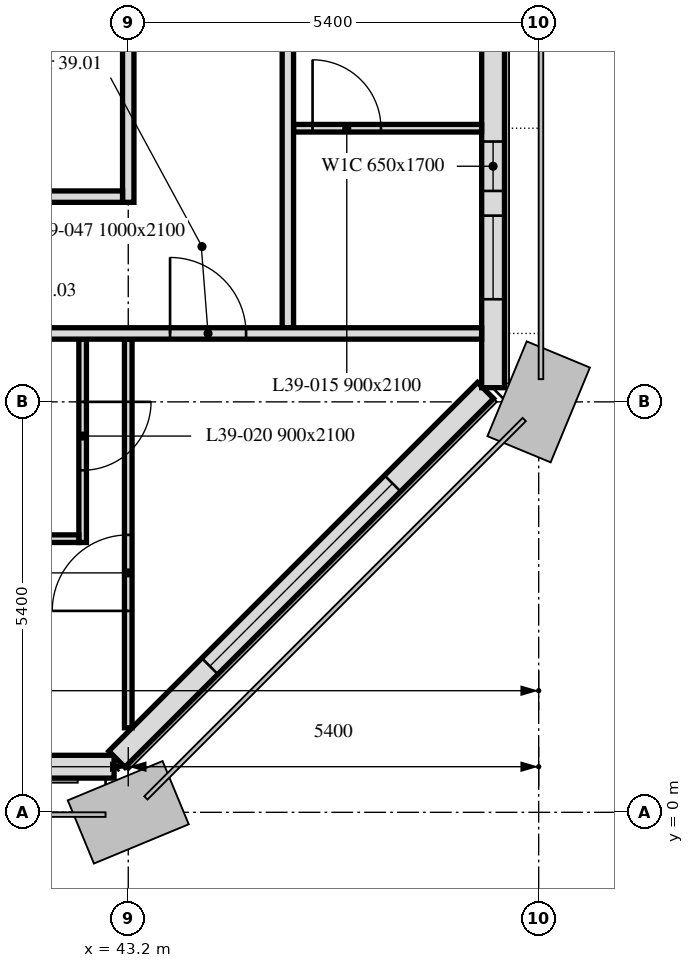
"""IFC4 building model, lengths in metres.
Left out: names, types, materials, properties, quantities, classifications, styles, units other than length and angle.
Written with IfcOpenShell. Run it as: python <this file> out.ifc"""

import sys

from ifc_helpers import new_model, si_unit, direction, frame, frame_2d, origin, place, context, subcontext, project, spatial, rectangle, extrude, element, fill, save


model = new_model("IFC4")
c1 = context("Model", 3, precision=1e-05, world=origin(), true_north=direction((0.0, 1.0)))
c2 = subcontext(c1, "Body", "Model", "MODEL_VIEW")
j1 = project(units=[si_unit("LENGTHUNIT", "METRE"), si_unit("PLANEANGLEUNIT", "RADIAN")], contexts=[c1])
p1 = place(None, origin())
s1 = spatial("IfcSite", under=j1, at=p1, CompositionType="ELEMENT")
p2 = place(p1, origin())
s2 = spatial("IfcBuilding", under=s1, at=p2, CompositionType="ELEMENT")
p3 = place(p2, frame((0.0, 0.0, 166.0)))
s3 = spatial("IfcBuildingStorey", under=s2, at=p3, CompositionType="ELEMENT", Elevation=166.0)
p4 = place(p3, frame((10.986, 0.6, 0.0), z_axis=(0.0, 0.0, 1.0), x_axis=(1.0, 0.0, 0.0)))
e1 = element("IfcWall", 1, at=p4, inside=s3, PredefinedType="SOLIDWALL", context=c2, shape_type="SweptSolid", body=[
    extrude(rectangle(XDim=32.027, YDim=0.3, at=frame_2d((16.014, 0.0))), origin(), (0.0, 0.0, 1.0), 3.0),
])
p5 = place(p4, frame((0.814, 0.0, 0.9)))
e2 = element("IfcOpeningElement", 2, at=p5, cuts=e1, PredefinedType="OPENING", context=c2, shape_type="SweptSolid", body=[
    extrude(rectangle(XDim=3.4, YDim=1.7, at=frame_2d((1.7, 0.85))), frame((0.0, 0.16, 0.0), z_axis=(0.0, -1.0, 0.0), x_axis=(1.0, 0.0, 0.0)), (0.0, 0.0, 1.0), 0.32),
])
p6 = place(p4, frame((6.564, 0.0, 0.9)))
e3 = element("IfcOpeningElement", 3, at=p6, cuts=e1, PredefinedType="OPENING", context=c2, shape_type="SweptSolid", body=[
    extrude(rectangle(XDim=1.1, YDim=1.7, at=frame_2d((0.55, 0.85))), frame((0.0, 0.16, 0.0), z_axis=(0.0, -1.0, 0.0), x_axis=(1.0, 0.0, 0.0)), (0.0, 0.0, 1.0), 0.32),
])
p7 = place(p4, frame((11.614, 0.0, 0.9)))
e4 = element("IfcOpeningElement", 4, at=p7, cuts=e1, PredefinedType="OPENING", context=c2, shape_type="SweptSolid", body=[
    extrude(rectangle(XDim=3.4, YDim=1.7, at=frame_2d((1.7, 0.85))), frame((0.0, 0.16, 0.0), z_axis=(0.0, -1.0, 0.0), x_axis=(1.0, 0.0, 0.0)), (0.0, 0.0, 1.0), 0.32),
])
p8 = place(p4, frame((17.364, 0.0, 0.9)))
e5 = element("IfcOpeningElement", 5, at=p8, cuts=e1, PredefinedType="OPENING", context=c2, shape_type="SweptSolid", body=[
    extrude(rectangle(XDim=1.1, YDim=1.7, at=frame_2d((0.55, 0.85))), frame((0.0, 0.16, 0.0), z_axis=(0.0, -1.0, 0.0), x_axis=(1.0, 0.0, 0.0)), (0.0, 0.0, 1.0), 0.32),
])
p9 = place(p4, frame((22.414, 0.0, 0.9)))
e6 = element("IfcOpeningElement", 6, at=p9, cuts=e1, PredefinedType="OPENING", context=c2, shape_type="SweptSolid", body=[
    extrude(rectangle(XDim=3.4, YDim=1.7, at=frame_2d((1.7, 0.85))), frame((0.0, 0.16, 0.0), z_axis=(0.0, -1.0, 0.0), x_axis=(1.0, 0.0, 0.0)), (0.0, 0.0, 1.0), 0.32),
])
p10 = place(p4, frame((28.164, 0.0, 0.9)))
e7 = element("IfcOpeningElement", 7, at=p10, cuts=e1, PredefinedType="OPENING", context=c2, shape_type="SweptSolid", body=[
    extrude(rectangle(XDim=1.1, YDim=1.7, at=frame_2d((0.55, 0.85))), frame((0.0, 0.16, 0.0), z_axis=(0.0, -1.0, 0.0), x_axis=(1.0, 0.0, 0.0)), (0.0, 0.0, 1.0), 0.32),
])
p11 = place(p3, frame((43.051, 0.699, 0.0), z_axis=(0.0, 0.0, 1.0), x_axis=(0.707106781187, 0.707106781187, 0.0)))
e8 = element("IfcWall", 8, at=p11, inside=s3, PredefinedType="SOLIDWALL", context=c2, shape_type="SweptSolid", body=[
    extrude(rectangle(XDim=6.86, YDim=0.3, at=frame_2d((3.43, 0.0))), origin(), (0.0, 0.0, 1.0), 3.0),
])
p12 = place(p11, frame((1.73, 0.0, 0.9)))
e9 = element("IfcOpeningElement", 9, at=p12, cuts=e8, PredefinedType="OPENING", context=c2, shape_type="SweptSolid", body=[
    extrude(rectangle(XDim=3.4, YDim=1.7, at=frame_2d((1.7, 0.85))), frame((0.0, 0.16, 0.0), z_axis=(0.0, -1.0, 0.0), x_axis=(1.0, 0.0, 0.0)), (0.0, 0.0, 1.0), 0.32),
])
p13 = place(p3, frame((48.0, 5.586, 0.0), z_axis=(0.0, 0.0, 1.0), x_axis=(0.0, 1.0, 0.0)))
e10 = element("IfcWall", 10, at=p13, inside=s3, PredefinedType="SOLIDWALL", context=c2, shape_type="SweptSolid", body=[
    extrude(rectangle(XDim=32.027, YDim=0.3, at=frame_2d((16.014, 0.0))), origin(), (0.0, 0.0, 1.0), 3.0),
])
p14 = place(p13, frame((1.164, 0.0, 0.9)))
e11 = element("IfcOpeningElement", 11, at=p14, cuts=e10, PredefinedType="OPENING", context=c2, shape_type="SweptSolid", body=[
    extrude(rectangle(XDim=1.1, YDim=1.7, at=frame_2d((0.55, 0.85))), frame((0.0, 0.16, 0.0), z_axis=(0.0, -1.0, 0.0), x_axis=(1.0, 0.0, 0.0)), (0.0, 0.0, 1.0), 0.32),
])
p15 = place(p13, frame((2.589, 0.0, 0.9)))
e12 = element("IfcOpeningElement", 12, at=p15, cuts=e10, PredefinedType="OPENING", context=c2, shape_type="SweptSolid", body=[
    extrude(rectangle(XDim=0.65, YDim=1.7, at=frame_2d((0.325, 0.85))), frame((0.0, 0.16, 0.0), z_axis=(0.0, -1.0, 0.0), x_axis=(1.0, 0.0, 0.0)), (0.0, 0.0, 1.0), 0.32),
])
p16 = place(p13, frame((6.564, 0.0, 0.9)))
e13 = element("IfcOpeningElement", 13, at=p16, cuts=e10, PredefinedType="OPENING", context=c2, shape_type="SweptSolid", body=[
    extrude(rectangle(XDim=1.1, YDim=1.7, at=frame_2d((0.55, 0.85))), frame((0.0, 0.16, 0.0), z_axis=(0.0, -1.0, 0.0), x_axis=(1.0, 0.0, 0.0)), (0.0, 0.0, 1.0), 0.32),
])
p17 = place(p13, frame((8.164, 0.0, 0.9)))
e14 = element("IfcOpeningElement", 14, at=p17, cuts=e10, PredefinedType="OPENING", context=c2, shape_type="SweptSolid", body=[
    extrude(rectangle(XDim=1.1, YDim=1.7, at=frame_2d((0.55, 0.85))), frame((0.0, 0.16, 0.0), z_axis=(0.0, -1.0, 0.0), x_axis=(1.0, 0.0, 0.0)), (0.0, 0.0, 1.0), 0.32),
])
p18 = place(p13, frame((11.614, 0.0, 0.9)))
e15 = element("IfcOpeningElement", 15, at=p18, cuts=e10, PredefinedType="OPENING", context=c2, shape_type="SweptSolid", body=[
    extrude(rectangle(XDim=3.4, YDim=1.7, at=frame_2d((1.7, 0.85))), frame((0.0, 0.16, 0.0), z_axis=(0.0, -1.0, 0.0), x_axis=(1.0, 0.0, 0.0)), (0.0, 0.0, 1.0), 0.32),
])
p19 = place(p13, frame((17.364, 0.0, 0.9)))
e16 = element("IfcOpeningElement", 16, at=p19, cuts=e10, PredefinedType="OPENING", context=c2, shape_type="SweptSolid", body=[
    extrude(rectangle(XDim=1.1, YDim=1.7, at=frame_2d((0.55, 0.85))), frame((0.0, 0.16, 0.0), z_axis=(0.0, -1.0, 0.0), x_axis=(1.0, 0.0, 0.0)), (0.0, 0.0, 1.0), 0.32),
])
p20 = place(p13, frame((18.964, 0.0, 0.9)))
e17 = element("IfcOpeningElement", 17, at=p20, cuts=e10, PredefinedType="OPENING", context=c2, shape_type="SweptSolid", body=[
    extrude(rectangle(XDim=1.1, YDim=1.7, at=frame_2d((0.55, 0.85))), frame((0.0, 0.16, 0.0), z_axis=(0.0, -1.0, 0.0), x_axis=(1.0, 0.0, 0.0)), (0.0, 0.0, 1.0), 0.32),
])
p21 = place(p13, frame((22.414, 0.0, 0.9)))
e18 = element("IfcOpeningElement", 18, at=p21, cuts=e10, PredefinedType="OPENING", context=c2, shape_type="SweptSolid", body=[
    extrude(rectangle(XDim=3.4, YDim=1.7, at=frame_2d((1.7, 0.85))), frame((0.0, 0.16, 0.0), z_axis=(0.0, -1.0, 0.0), x_axis=(1.0, 0.0, 0.0)), (0.0, 0.0, 1.0), 0.32),
])
p22 = place(p13, frame((28.164, 0.0, 0.9)))
e19 = element("IfcOpeningElement", 19, at=p22, cuts=e10, PredefinedType="OPENING", context=c2, shape_type="SweptSolid", body=[
    extrude(rectangle(XDim=1.1, YDim=1.7, at=frame_2d((0.55, 0.85))), frame((0.0, 0.16, 0.0), z_axis=(0.0, -1.0, 0.0), x_axis=(1.0, 0.0, 0.0)), (0.0, 0.0, 1.0), 0.32),
])
p23 = place(p13, frame((29.764, 0.0, 0.9)))
e20 = element("IfcOpeningElement", 20, at=p23, cuts=e10, PredefinedType="OPENING", context=c2, shape_type="SweptSolid", body=[
    extrude(rectangle(XDim=1.1, YDim=1.7, at=frame_2d((0.55, 0.85))), frame((0.0, 0.16, 0.0), z_axis=(0.0, -1.0, 0.0), x_axis=(1.0, 0.0, 0.0)), (0.0, 0.0, 1.0), 0.32),
])
p24 = place(p3, frame((45.375, 9.0, 0.0), z_axis=(0.0, 0.0, 1.0), x_axis=(1.0, 0.0, 0.0)))
e21 = element("IfcWall", 21, at=p24, inside=s3, PredefinedType="PARTITIONING", context=c2, shape_type="SweptSolid", body=[
    extrude(rectangle(XDim=2.474, YDim=0.1, at=frame_2d((1.237, 0.0))), origin(), (0.0, 0.0, 1.0), 3.0),
])
p25 = place(p24, frame((0.25, 0.0, 0.0)))
e22 = element("IfcOpeningElement", 22, at=p25, cuts=e21, PredefinedType="OPENING", context=c2, shape_type="SweptSolid", body=[
    extrude(rectangle(XDim=0.9, YDim=2.1, at=frame_2d((0.45, 1.05))), frame((0.0, 0.05, 0.0), z_axis=(0.0, -1.0, 0.0), x_axis=(1.0, 0.0, 0.0)), (0.0, 0.0, 1.0), 0.1),
])
p26 = place(p3, frame((45.3, 21.525, 0.0), z_axis=(0.0, 0.0, 1.0), x_axis=(0.0, -1.0, 0.0)))
e23 = element("IfcWall", 23, at=p26, inside=s3, PredefinedType="PARTITIONING", context=c2, shape_type="SweptSolid", body=[
    extrude(rectangle(XDim=15.15, YDim=0.15, at=frame_2d((7.575, 0.0))), origin(), (0.0, 0.0, 1.0), 2.4),
])
p27 = place(p26, frame((2.125, 0.0, 0.0)))
e24 = element("IfcOpeningElement", 24, at=p27, cuts=e23, PredefinedType="OPENING", context=c2, shape_type="SweptSolid", body=[
    extrude(rectangle(XDim=1.0, YDim=2.1, at=frame_2d((0.5, 1.05))), frame((0.0, 0.075, 0.0), z_axis=(0.0, -1.0, 0.0), x_axis=(1.0, 0.0, 0.0)), (0.0, 0.0, 1.0), 0.15),
])
p28 = place(p26, frame((7.958, 0.0, 0.0)))
e25 = element("IfcOpeningElement", 25, at=p28, cuts=e23, PredefinedType="OPENING", context=c2, shape_type="SweptSolid", body=[
    extrude(rectangle(XDim=1.0, YDim=2.1, at=frame_2d((0.5, 1.05))), frame((0.0, 0.075, 0.0), z_axis=(0.0, -1.0, 0.0), x_axis=(1.0, 0.0, 0.0)), (0.0, 0.0, 1.0), 0.15),
])
p29 = place(p3, frame((43.2, 1.112, 0.0), z_axis=(0.0, 0.0, 1.0), x_axis=(0.0, 1.0, 0.0)))
e26 = element("IfcWall", 26, at=p29, inside=s3, PredefinedType="PARTITIONING", context=c2, shape_type="SweptSolid", body=[
    extrude(rectangle(XDim=5.113, YDim=0.1, at=frame_2d((2.557, 0.0))), origin(), (0.0, 0.0, 1.0), 3.0),
])
p30 = place(p29, frame((1.538, 0.0, 0.0)))
e27 = element("IfcOpeningElement", 27, at=p30, cuts=e26, PredefinedType="OPENING", context=c2, shape_type="SweptSolid", body=[
    extrude(rectangle(XDim=1.0, YDim=2.1, at=frame_2d((0.5, 1.05))), frame((0.0, 0.05, 0.0), z_axis=(0.0, -1.0, 0.0), x_axis=(1.0, 0.0, 0.0)), (0.0, 0.0, 1.0), 0.1),
])
p31 = place(p3, frame((42.6, 6.225, 0.0), z_axis=(0.0, 0.0, 1.0), x_axis=(0.0, -1.0, 0.0)))
e28 = element("IfcWall", 28, at=p31, inside=s3, PredefinedType="PARTITIONING", context=c2, shape_type="SweptSolid", body=[
    extrude(rectangle(XDim=2.675, YDim=0.1, at=frame_2d((1.337, 0.0))), origin(), (0.0, 0.0, 1.0), 3.0),
])
p32 = place(p31, frame((0.825, 0.0, 0.0)))
e29 = element("IfcOpeningElement", 29, at=p32, cuts=e28, PredefinedType="OPENING", context=c2, shape_type="SweptSolid", body=[
    extrude(rectangle(XDim=0.9, YDim=2.1, at=frame_2d((0.45, 1.05))), frame((0.0, 0.05, 0.0), z_axis=(0.0, -1.0, 0.0), x_axis=(1.0, 0.0, 0.0)), (0.0, 0.0, 1.0), 0.1),
])
p33 = place(p3, frame((42.55, 3.6, 0.0), z_axis=(0.0, 0.0, 1.0), x_axis=(-1.0, 0.0, 0.0)))
e30 = element("IfcWall", 30, at=p33, inside=s3, PredefinedType="PARTITIONING", context=c2, shape_type="SweptSolid", body=[
    extrude(rectangle(XDim=2.4, YDim=0.1, at=frame_2d((1.2, 0.0))), origin(), (0.0, 0.0, 1.0), 3.0),
])
p34 = place(p3, frame((6.151, 6.3, 0.0), z_axis=(0.0, 0.0, 1.0), x_axis=(1.0, 0.0, 0.0)))
e31 = element("IfcWall", 31, at=p34, inside=s3, PredefinedType="PARTITIONING", context=c2, shape_type="SweptSolid", body=[
    extrude(rectangle(XDim=41.698, YDim=0.15, at=frame_2d((20.849, 0.0))), origin(), (0.0, 0.0, 1.0), 2.4),
])
p35 = place(p34, frame((1.132, 0.0, 0.0)))
e32 = element("IfcOpeningElement", 32, at=p35, cuts=e31, PredefinedType="OPENING", context=c2, shape_type="SweptSolid", body=[
    extrude(rectangle(XDim=1.0, YDim=2.1, at=frame_2d((0.5, 1.05))), frame((0.0, 0.075, 0.0), z_axis=(0.0, -1.0, 0.0), x_axis=(1.0, 0.0, 0.0)), (0.0, 0.0, 1.0), 0.15),
])
p36 = place(p34, frame((13.049, 0.0, 0.0)))
e33 = element("IfcOpeningElement", 33, at=p36, cuts=e31, PredefinedType="OPENING", context=c2, shape_type="SweptSolid", body=[
    extrude(rectangle(XDim=1.0, YDim=2.1, at=frame_2d((0.5, 1.05))), frame((0.0, 0.075, 0.0), z_axis=(0.0, -1.0, 0.0), x_axis=(1.0, 0.0, 0.0)), (0.0, 0.0, 1.0), 0.15),
])
p37 = place(p34, frame((17.649, 0.0, 0.0)))
e34 = element("IfcOpeningElement", 34, at=p37, cuts=e31, PredefinedType="OPENING", context=c2, shape_type="SweptSolid", body=[
    extrude(rectangle(XDim=1.0, YDim=2.1, at=frame_2d((0.5, 1.05))), frame((0.0, 0.075, 0.0), z_axis=(0.0, -1.0, 0.0), x_axis=(1.0, 0.0, 0.0)), (0.0, 0.0, 1.0), 0.15),
])
p38 = place(p34, frame((29.249, 0.0, 0.0)))
e35 = element("IfcOpeningElement", 35, at=p38, cuts=e31, PredefinedType="OPENING", context=c2, shape_type="SweptSolid", body=[
    extrude(rectangle(XDim=1.0, YDim=2.1, at=frame_2d((0.5, 1.05))), frame((0.0, 0.075, 0.0), z_axis=(0.0, -1.0, 0.0), x_axis=(1.0, 0.0, 0.0)), (0.0, 0.0, 1.0), 0.15),
])
p39 = place(p34, frame((37.599, 0.0, 0.0)))
e36 = element("IfcOpeningElement", 36, at=p39, cuts=e31, PredefinedType="OPENING", context=c2, shape_type="SweptSolid", body=[
    extrude(rectangle(XDim=1.0, YDim=2.1, at=frame_2d((0.5, 1.05))), frame((0.0, 0.075, 0.0), z_axis=(0.0, -1.0, 0.0), x_axis=(1.0, 0.0, 0.0)), (0.0, 0.0, 1.0), 0.15),
])
p40 = place(p3, frame((43.2, 10.355, 0.0), z_axis=(0.0, 0.0, 1.0), x_axis=(0.0, -1.0, 0.0)))
e37 = element("IfcWall", 37, at=p40, inside=s3, PredefinedType="PARTITIONING", context=c2, shape_type="SweptSolid", body=[
    extrude(rectangle(XDim=2.33, YDim=0.15, at=frame_2d((1.165, 0.0))), origin(), (0.0, 0.0, 1.0), 3.0),
])
p41 = place(p3, frame((6.151, 8.1, 0.0), z_axis=(0.0, 0.0, 1.0), x_axis=(1.0, 0.0, 0.0)))
e38 = element("IfcWall", 38, at=p41, inside=s3, PredefinedType="PARTITIONING", context=c2, shape_type="SweptSolid", body=[
    extrude(rectangle(XDim=36.974, YDim=0.15, at=frame_2d((18.487, 0.0))), origin(), (0.0, 0.0, 1.0), 2.4),
])
p42 = place(p41, frame((13.416, 0.0, 0.0)))
e39 = element("IfcOpeningElement", 39, at=p42, cuts=e38, PredefinedType="OPENING", context=c2, shape_type="SweptSolid", body=[
    extrude(rectangle(XDim=1.0, YDim=2.1, at=frame_2d((0.5, 1.05))), frame((0.0, 0.075, 0.0), z_axis=(0.0, -1.0, 0.0), x_axis=(1.0, 0.0, 0.0)), (0.0, 0.0, 1.0), 0.15),
])
p43 = place(p41, frame((23.049, 0.0, 0.0)))
e40 = element("IfcOpeningElement", 40, at=p43, cuts=e38, PredefinedType="OPENING", context=c2, shape_type="SweptSolid", body=[
    extrude(rectangle(XDim=1.0, YDim=2.1, at=frame_2d((0.5, 1.05))), frame((0.0, 0.075, 0.0), z_axis=(0.0, -1.0, 0.0), x_axis=(1.0, 0.0, 0.0)), (0.0, 0.0, 1.0), 0.15),
])
p44 = place(p41, frame((2.029, 0.0, 0.0)))
e41 = element("IfcOpeningElement", 41, at=p44, cuts=e38, PredefinedType="OPENING", context=c2, shape_type="SweptSolid", body=[
    extrude(rectangle(XDim=1.0, YDim=2.1, at=frame_2d((0.5, 1.05))), frame((0.0, 0.075, 0.0), z_axis=(0.0, -1.0, 0.0), x_axis=(1.0, 0.0, 0.0)), (0.0, 0.0, 1.0), 0.15),
])
p45 = place(p41, frame((27.374, 0.0, 0.0)))
e42 = element("IfcOpeningElement", 42, at=p45, cuts=e38, PredefinedType="OPENING", context=c2, shape_type="SweptSolid", body=[
    extrude(rectangle(XDim=1.0, YDim=2.1, at=frame_2d((0.5, 1.05))), frame((0.0, 0.075, 0.0), z_axis=(0.0, -1.0, 0.0), x_axis=(1.0, 0.0, 0.0)), (0.0, 0.0, 1.0), 0.15),
])
p46 = place(p41, frame((7.924, 0.0, 0.0)))
e43 = element("IfcOpeningElement", 43, at=p46, cuts=e38, PredefinedType="OPENING", context=c2, shape_type="SweptSolid", body=[
    extrude(rectangle(XDim=1.0, YDim=2.1, at=frame_2d((0.5, 1.05))), frame((0.0, 0.075, 0.0), z_axis=(0.0, -1.0, 0.0), x_axis=(1.0, 0.0, 0.0)), (0.0, 0.0, 1.0), 0.15),
])
p47 = place(p41, frame((4.699, 0.0, 0.0)))
e44 = element("IfcOpeningElement", 44, at=p47, cuts=e38, PredefinedType="OPENING", context=c2, shape_type="SweptSolid", body=[
    extrude(rectangle(XDim=1.8, YDim=2.4, at=frame_2d((0.9, 1.2))), frame((0.0, 0.075, 0.0), z_axis=(0.0, -1.0, 0.0), x_axis=(1.0, 0.0, 0.0)), (0.0, 0.0, 1.0), 0.15),
])
p48 = place(p41, frame((30.199, 0.0, 0.0)))
e45 = element("IfcOpeningElement", 45, at=p48, cuts=e38, PredefinedType="OPENING", context=c2, shape_type="SweptSolid", body=[
    extrude(rectangle(XDim=1.0, YDim=2.1, at=frame_2d((0.5, 1.05))), frame((0.0, 0.075, 0.0), z_axis=(0.0, -1.0, 0.0), x_axis=(1.0, 0.0, 0.0)), (0.0, 0.0, 1.0), 0.15),
])
p49 = place(p12, origin())
e46 = element("IfcWindow", 46, at=p49, inside=s3, PartitioningType="SINGLE_PANEL", PredefinedType="WINDOW", context=c2, shape_type="SweptSolid", body=[
    extrude(rectangle(XDim=3.4, YDim=1.7, at=frame_2d((1.7, 0.85))), frame((0.0, 0.03, 0.0), z_axis=(0.0, -1.0, 0.0), x_axis=(1.0, 0.0, 0.0)), (0.0, 0.0, 1.0), 0.06),
])
fill(e9, e46)
p50 = place(p14, origin())
e47 = element("IfcWindow", 47, at=p50, inside=s3, PartitioningType="SINGLE_PANEL", PredefinedType="WINDOW", context=c2, shape_type="SweptSolid", body=[
    extrude(rectangle(XDim=1.1, YDim=1.7, at=frame_2d((0.55, 0.85))), frame((0.0, 0.03, 0.0), z_axis=(0.0, -1.0, 0.0), x_axis=(1.0, 0.0, 0.0)), (0.0, 0.0, 1.0), 0.06),
])
fill(e11, e47)
p51 = place(p15, origin())
e48 = element("IfcWindow", 48, at=p51, inside=s3, PartitioningType="SINGLE_PANEL", PredefinedType="WINDOW", context=c2, shape_type="SweptSolid", body=[
    extrude(rectangle(XDim=0.65, YDim=1.7, at=frame_2d((0.325, 0.85))), frame((0.0, 0.03, 0.0), z_axis=(0.0, -1.0, 0.0), x_axis=(1.0, 0.0, 0.0)), (0.0, 0.0, 1.0), 0.06),
])
fill(e12, e48)
p52 = place(p25, origin())
e49 = element("IfcDoor", 49, at=p52, inside=s3, OperationType="SINGLE_SWING_LEFT", PredefinedType="DOOR", context=c2, shape_type="SweptSolid", body=[
    extrude(rectangle(XDim=0.9, YDim=2.1, at=frame_2d((0.45, 1.05))), frame((0.0, 0.025, 0.0), z_axis=(0.0, -1.0, 0.0), x_axis=(1.0, 0.0, 0.0)), (0.0, 0.0, 1.0), 0.05),
])
fill(e22, e49)
p53 = place(p32, origin())
e50 = element("IfcDoor", 50, at=p53, inside=s3, OperationType="SINGLE_SWING_RIGHT", PredefinedType="DOOR", context=c2, shape_type="SweptSolid", body=[
    extrude(rectangle(XDim=0.9, YDim=2.1, at=frame_2d((0.45, 1.05))), frame((0.0, 0.025, 0.0), z_axis=(0.0, -1.0, 0.0), x_axis=(1.0, 0.0, 0.0)), (0.0, 0.0, 1.0), 0.05),
])
fill(e29, e50)
p54 = place(p30, origin())
e51 = element("IfcDoor", 51, at=p54, inside=s3, OperationType="SINGLE_SWING_RIGHT", PredefinedType="DOOR", context=c2, shape_type="SweptSolid", body=[
    extrude(rectangle(XDim=1.0, YDim=2.1, at=frame_2d((0.5, 1.05))), frame((0.0, 0.025, 0.0), z_axis=(0.0, -1.0, 0.0), x_axis=(1.0, 0.0, 0.0)), (0.0, 0.0, 1.0), 0.05),
])
fill(e27, e51)
p55 = place(p39, origin())
e52 = element("IfcDoor", 52, at=p55, inside=s3, OperationType="SINGLE_SWING_LEFT", PredefinedType="DOOR", context=c2, shape_type="SweptSolid", body=[
    extrude(rectangle(XDim=1.0, YDim=2.1, at=frame_2d((0.5, 1.05))), frame((0.0, 0.025, 0.0), z_axis=(0.0, -1.0, 0.0), x_axis=(1.0, 0.0, 0.0)), (0.0, 0.0, 1.0), 0.05),
])
fill(e36, e52)
save(model, sys.argv[1])
